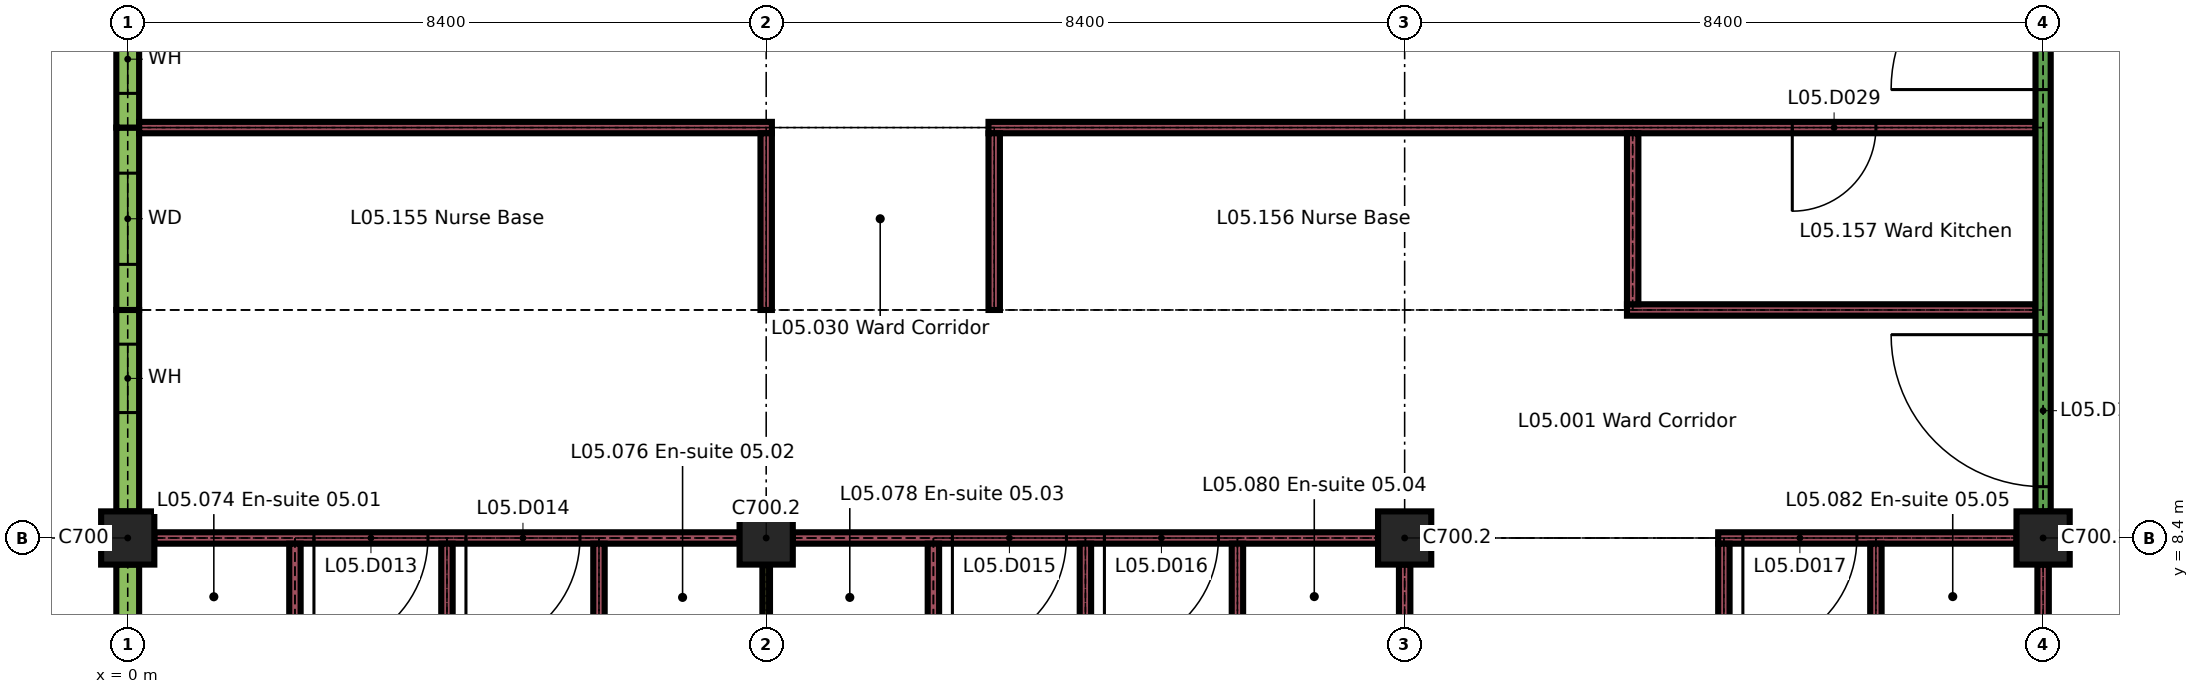
"""IFC4 building model, lengths in metres.
Left out: names, types, materials, properties, quantities, classifications, styles, units other than length and angle.
Written with IfcOpenShell. Run it as: python <this file> out.ifc"""

import sys

from ifc_helpers import new_model, si_unit, direction, frame, frame_2d, origin, origin_2d, place, context, subcontext, project, spatial, rectangle, extrude, element, fill, save


model = new_model("IFC4")
c1 = context("Model", 3, precision=1e-05, world=origin(), true_north=direction((0.0, 1.0)))
c2 = subcontext(c1, "Body", "Model", "MODEL_VIEW")
j1 = project(units=[si_unit("LENGTHUNIT", "METRE"), si_unit("PLANEANGLEUNIT", "RADIAN")], contexts=[c1])
p1 = place(None, origin())
s1 = spatial("IfcSite", under=j1, at=p1, CompositionType="ELEMENT")
p2 = place(p1, origin())
s2 = spatial("IfcBuilding", under=s1, at=p2, CompositionType="ELEMENT")
p3 = place(p2, frame((0.0, 0.0, 22.5)))
s3 = spatial("IfcBuildingStorey", under=s2, at=p3, CompositionType="ELEMENT", Elevation=22.5)
for number, where, z_axis, x_axis in (
    (1, (0.0, 8.4, 0.0), (0.0, 0.0, 1.0), (1.0, 0.0, 0.0)),
    (2, (8.4, 8.4, 0.0), (0.0, 0.0, 1.0), (1.0, 0.0, 0.0)),
    (3, (16.8, 8.4, 0.0), (0.0, 0.0, 1.0), (1.0, 0.0, 0.0)),
    (4, (25.2, 8.4, 0.0), (0.0, 0.0, 1.0), (1.0, 0.0, 0.0)),
):
    element("IfcColumn", number, at=place(p3, frame(where, z_axis=z_axis, x_axis=x_axis)), inside=s3, PredefinedType="COLUMN", context=c2, shape_type="SweptSolid", body=[
        extrude(rectangle(XDim=0.7, YDim=0.7, at=origin_2d()), origin(), (0.0, 0.0, 1.0), 3.26),
    ])
p4 = place(p3, frame((0.0, 6.0, 0.0), z_axis=(0.0, 0.0, 1.0), x_axis=(0.0, 1.0, 0.0)))
e5 = element("IfcWall", 5, at=p4, inside=s3, PredefinedType="SOLIDWALL", context=c2, shape_type="SweptSolid", body=[
    extrude(rectangle(XDim=2.05, YDim=0.3, at=frame_2d((1.025, 0.0))), origin(), (0.0, 0.0, 1.0), 2.96),
])
p5 = place(p3, frame((0.0, 8.75, 0.0), z_axis=(0.0, 0.0, 1.0), x_axis=(0.0, 1.0, 0.0)))
e6 = element("IfcWall", 6, at=p5, inside=s3, PredefinedType="SOLIDWALL", context=c2, shape_type="SweptSolid", body=[
    extrude(rectangle(XDim=2.65, YDim=0.3, at=frame_2d((1.325, 0.0))), origin(), (0.0, 0.0, 1.0), 2.96),
])
p6 = place(p5, frame((1.3, 0.0, 0.9)))
e7 = element("IfcOpeningElement", 7, at=p6, cuts=e6, PredefinedType="OPENING", context=c2, shape_type="SweptSolid", body=[
    extrude(rectangle(XDim=0.9, YDim=1.5, at=frame_2d((0.45, 0.75))), frame((0.0, 0.16, 0.0), z_axis=(0.0, -1.0, 0.0), x_axis=(1.0, 0.0, 0.0)), (0.0, 0.0, 1.0), 0.32),
])
p7 = place(p3, frame((0.0, 11.4, 0.0), z_axis=(0.0, 0.0, 1.0), x_axis=(0.0, 1.0, 0.0)))
e8 = element("IfcWall", 8, at=p7, inside=s3, PredefinedType="SOLIDWALL", context=c2, shape_type="SweptSolid", body=[
    extrude(rectangle(XDim=2.4, YDim=0.3, at=frame_2d((1.2, 0.0))), origin(), (0.0, 0.0, 1.0), 2.96),
])
p8 = place(p7, frame((0.6, 0.0, 0.9)))
e9 = element("IfcOpeningElement", 9, at=p8, cuts=e8, PredefinedType="OPENING", context=c2, shape_type="SweptSolid", body=[
    extrude(rectangle(XDim=1.2, YDim=1.5, at=frame_2d((0.6, 0.75))), frame((0.0, 0.16, 0.0), z_axis=(0.0, -1.0, 0.0), x_axis=(1.0, 0.0, 0.0)), (0.0, 0.0, 1.0), 0.32),
])
p9 = place(p3, frame((0.0, 13.8, 0.0), z_axis=(0.0, 0.0, 1.0), x_axis=(0.0, 1.0, 0.0)))
e10 = element("IfcWall", 10, at=p9, inside=s3, PredefinedType="SOLIDWALL", context=c2, shape_type="SweptSolid", body=[
    extrude(rectangle(XDim=3.0, YDim=0.3, at=frame_2d((1.5, 0.0))), origin(), (0.0, 0.0, 1.0), 2.96),
])
p10 = place(p9, frame((0.45, 0.0, 0.9)))
e11 = element("IfcOpeningElement", 11, at=p10, cuts=e10, PredefinedType="OPENING", context=c2, shape_type="SweptSolid", body=[
    extrude(rectangle(XDim=0.9, YDim=1.5, at=frame_2d((0.45, 0.75))), frame((0.0, 0.16, 0.0), z_axis=(0.0, -1.0, 0.0), x_axis=(1.0, 0.0, 0.0)), (0.0, 0.0, 1.0), 0.32),
])
p11 = place(p3, frame((0.35, 8.4, 0.0), z_axis=(0.0, 0.0, 1.0), x_axis=(1.0, 0.0, 0.0)))
e12 = element("IfcWall", 12, at=p11, inside=s3, PredefinedType="PARTITIONING", context=c2, shape_type="SweptSolid", body=[
    extrude(rectangle(XDim=7.7, YDim=0.15, at=frame_2d((3.85, 0.0))), origin(), (0.0, 0.0, 1.0), 3.26),
])
p12 = place(p11, frame((2.1, 0.0, 0.0)))
e13 = element("IfcOpeningElement", 13, at=p12, cuts=e12, PredefinedType="OPENING", context=c2, shape_type="SweptSolid", body=[
    extrude(rectangle(XDim=1.5, YDim=2.4, at=frame_2d((0.75, 1.2))), frame((0.0, 0.085, 0.0), z_axis=(0.0, -1.0, 0.0), x_axis=(1.0, 0.0, 0.0)), (0.0, 0.0, 1.0), 0.17),
])
p13 = place(p11, frame((4.1, 0.0, 0.0)))
e14 = element("IfcOpeningElement", 14, at=p13, cuts=e12, PredefinedType="OPENING", context=c2, shape_type="SweptSolid", body=[
    extrude(rectangle(XDim=1.5, YDim=2.4, at=frame_2d((0.75, 1.2))), frame((0.0, 0.085, 0.0), z_axis=(0.0, -1.0, 0.0), x_axis=(1.0, 0.0, 0.0)), (0.0, 0.0, 1.0), 0.17),
])
p14 = place(p3, frame((8.75, 8.4, 0.0), z_axis=(0.0, 0.0, 1.0), x_axis=(1.0, 0.0, 0.0)))
e15 = element("IfcWall", 15, at=p14, inside=s3, PredefinedType="PARTITIONING", context=c2, shape_type="SweptSolid", body=[
    extrude(rectangle(XDim=7.7, YDim=0.15, at=frame_2d((3.85, 0.0))), origin(), (0.0, 0.0, 1.0), 3.26),
])
p15 = place(p14, frame((2.1, 0.0, 0.0)))
e16 = element("IfcOpeningElement", 16, at=p15, cuts=e15, PredefinedType="OPENING", context=c2, shape_type="SweptSolid", body=[
    extrude(rectangle(XDim=1.5, YDim=2.4, at=frame_2d((0.75, 1.2))), frame((0.0, 0.085, 0.0), z_axis=(0.0, -1.0, 0.0), x_axis=(1.0, 0.0, 0.0)), (0.0, 0.0, 1.0), 0.17),
])
p16 = place(p14, frame((4.1, 0.0, 0.0)))
e17 = element("IfcOpeningElement", 17, at=p16, cuts=e15, PredefinedType="OPENING", context=c2, shape_type="SweptSolid", body=[
    extrude(rectangle(XDim=1.5, YDim=2.4, at=frame_2d((0.75, 1.2))), frame((0.0, 0.085, 0.0), z_axis=(0.0, -1.0, 0.0), x_axis=(1.0, 0.0, 0.0)), (0.0, 0.0, 1.0), 0.17),
])
p17 = place(p3, frame((20.925, 8.4, 0.0), z_axis=(0.0, 0.0, 1.0), x_axis=(1.0, 0.0, 0.0)))
e18 = element("IfcWall", 18, at=p17, inside=s3, PredefinedType="PARTITIONING", context=c2, shape_type="SweptSolid", body=[
    extrude(rectangle(XDim=3.925, YDim=0.15, at=frame_2d((1.962, 0.0))), origin(), (0.0, 0.0, 1.0), 3.26),
])
p18 = place(p17, frame((0.325, 0.0, 0.0)))
e19 = element("IfcOpeningElement", 19, at=p18, cuts=e18, PredefinedType="OPENING", context=c2, shape_type="SweptSolid", body=[
    extrude(rectangle(XDim=1.5, YDim=2.4, at=frame_2d((0.75, 1.2))), frame((0.0, 0.085, 0.0), z_axis=(0.0, -1.0, 0.0), x_axis=(1.0, 0.0, 0.0)), (0.0, 0.0, 1.0), 0.17),
])
p19 = place(p3, frame((19.725, 11.4, 0.0), z_axis=(0.0, 0.0, 1.0), x_axis=(1.0, 0.0, 0.0)))
e20 = element("IfcWall", 20, at=p19, inside=s3, PredefinedType="PARTITIONING", context=c2, shape_type="SweptSolid", body=[
    extrude(rectangle(XDim=5.375, YDim=0.15, at=frame_2d((2.688, 0.0))), origin(), (0.0, 0.0, 1.0), 3.26),
])
p20 = place(p3, frame((0.15, 13.8, 0.0), z_axis=(0.0, 0.0, 1.0), x_axis=(1.0, 0.0, 0.0)))
e21 = element("IfcWall", 21, at=p20, inside=s3, PredefinedType="PARTITIONING", context=c2, shape_type="SweptSolid", body=[
    extrude(rectangle(XDim=8.325, YDim=0.15, at=frame_2d((4.163, 0.0))), origin(), (0.0, 0.0, 1.0), 3.26),
])
p21 = place(p3, frame((11.325, 13.8, 0.0), z_axis=(0.0, 0.0, 1.0), x_axis=(1.0, 0.0, 0.0)))
e22 = element("IfcWall", 22, at=p21, inside=s3, PredefinedType="PARTITIONING", context=c2, shape_type="SweptSolid", body=[
    extrude(rectangle(XDim=13.775, YDim=0.15, at=frame_2d((6.888, 0.0))), origin(), (0.0, 0.0, 1.0), 3.26),
])
p22 = place(p21, frame((10.575, 0.0, 0.0)))
e23 = element("IfcOpeningElement", 23, at=p22, cuts=e22, PredefinedType="OPENING", context=c2, shape_type="SweptSolid", body=[
    extrude(rectangle(XDim=1.1, YDim=2.1, at=frame_2d((0.55, 1.05))), frame((0.0, 0.085, 0.0), z_axis=(0.0, -1.0, 0.0), x_axis=(1.0, 0.0, 0.0)), (0.0, 0.0, 1.0), 0.17),
])
p23 = place(p3, frame((2.2, 6.075, 0.0), z_axis=(0.0, 0.0, 1.0), x_axis=(0.0, 1.0, 0.0)))
e24 = element("IfcWall", 24, at=p23, inside=s3, PredefinedType="PARTITIONING", context=c2, shape_type="SweptSolid", body=[
    extrude(rectangle(XDim=2.25, YDim=0.15, at=frame_2d((1.125, 0.0))), origin(), (0.0, 0.0, 1.0), 3.26),
])
p24 = place(p3, frame((4.2, 0.15, 0.0), z_axis=(0.0, 0.0, 1.0), x_axis=(0.0, 1.0, 0.0)))
e25 = element("IfcWall", 25, at=p24, inside=s3, PredefinedType="PARTITIONING", context=c2, shape_type="SweptSolid", body=[
    extrude(rectangle(XDim=8.175, YDim=0.15, at=frame_2d((4.087, 0.0))), origin(), (0.0, 0.0, 1.0), 3.26),
])
p25 = place(p3, frame((6.2, 6.075, 0.0), z_axis=(0.0, 0.0, 1.0), x_axis=(0.0, 1.0, 0.0)))
e26 = element("IfcWall", 26, at=p25, inside=s3, PredefinedType="PARTITIONING", context=c2, shape_type="SweptSolid", body=[
    extrude(rectangle(XDim=2.25, YDim=0.15, at=frame_2d((1.125, 0.0))), origin(), (0.0, 0.0, 1.0), 3.26),
])
p26 = place(p3, frame((8.4, 6.075, 0.0), z_axis=(0.0, 0.0, 1.0), x_axis=(0.0, 1.0, 0.0)))
e27 = element("IfcWall", 27, at=p26, inside=s3, PredefinedType="PARTITIONING", context=c2, shape_type="SweptSolid", body=[
    extrude(rectangle(XDim=1.975, YDim=0.1, at=frame_2d((0.988, 0.0))), origin(), (0.0, 0.0, 1.0), 3.26),
])
p27 = place(p3, frame((8.4, 11.4, 0.0), z_axis=(0.0, 0.0, 1.0), x_axis=(0.0, 1.0, 0.0)))
e28 = element("IfcWall", 28, at=p27, inside=s3, PredefinedType="PARTITIONING", context=c2, shape_type="SweptSolid", body=[
    extrude(rectangle(XDim=2.325, YDim=0.15, at=frame_2d((1.163, 0.0))), origin(), (0.0, 0.0, 1.0), 3.26),
])
p28 = place(p3, frame((10.6, 6.075, 0.0), z_axis=(0.0, 0.0, 1.0), x_axis=(0.0, 1.0, 0.0)))
e29 = element("IfcWall", 29, at=p28, inside=s3, PredefinedType="PARTITIONING", context=c2, shape_type="SweptSolid", body=[
    extrude(rectangle(XDim=2.25, YDim=0.15, at=frame_2d((1.125, 0.0))), origin(), (0.0, 0.0, 1.0), 3.26),
])
p29 = place(p3, frame((11.4, 11.4, 0.0), z_axis=(0.0, 0.0, 1.0), x_axis=(0.0, 1.0, 0.0)))
e30 = element("IfcWall", 30, at=p29, inside=s3, PredefinedType="PARTITIONING", context=c2, shape_type="SweptSolid", body=[
    extrude(rectangle(XDim=2.325, YDim=0.15, at=frame_2d((1.163, 0.0))), origin(), (0.0, 0.0, 1.0), 3.26),
])
p30 = place(p3, frame((12.6, 0.15, 0.0), z_axis=(0.0, 0.0, 1.0), x_axis=(0.0, 1.0, 0.0)))
e31 = element("IfcWall", 31, at=p30, inside=s3, PredefinedType="PARTITIONING", context=c2, shape_type="SweptSolid", body=[
    extrude(rectangle(XDim=8.175, YDim=0.15, at=frame_2d((4.087, 0.0))), origin(), (0.0, 0.0, 1.0), 3.26),
])
p31 = place(p3, frame((14.6, 6.075, 0.0), z_axis=(0.0, 0.0, 1.0), x_axis=(0.0, 1.0, 0.0)))
e32 = element("IfcWall", 32, at=p31, inside=s3, PredefinedType="PARTITIONING", context=c2, shape_type="SweptSolid", body=[
    extrude(rectangle(XDim=2.25, YDim=0.15, at=frame_2d((1.125, 0.0))), origin(), (0.0, 0.0, 1.0), 3.26),
])
p32 = place(p3, frame((16.8, 0.35, 0.0), z_axis=(0.0, 0.0, 1.0), x_axis=(0.0, 1.0, 0.0)))
e33 = element("IfcWall", 33, at=p32, inside=s3, PredefinedType="PARTITIONING", context=c2, shape_type="SweptSolid", body=[
    extrude(rectangle(XDim=7.7, YDim=0.15, at=frame_2d((3.85, 0.0))), origin(), (0.0, 0.0, 1.0), 3.26),
])
p33 = place(p3, frame((19.8, 11.475, 0.0), z_axis=(0.0, 0.0, 1.0), x_axis=(0.0, 1.0, 0.0)))
e34 = element("IfcWall", 34, at=p33, inside=s3, PredefinedType="PARTITIONING", context=c2, shape_type="SweptSolid", body=[
    extrude(rectangle(XDim=2.25, YDim=0.15, at=frame_2d((1.125, 0.0))), origin(), (0.0, 0.0, 1.0), 3.26),
])
p34 = place(p3, frame((21.0, 0.15, 0.0), z_axis=(0.0, 0.0, 1.0), x_axis=(0.0, 1.0, 0.0)))
e35 = element("IfcWall", 35, at=p34, inside=s3, PredefinedType="PARTITIONING", context=c2, shape_type="SweptSolid", body=[
    extrude(rectangle(XDim=8.175, YDim=0.15, at=frame_2d((4.087, 0.0))), origin(), (0.0, 0.0, 1.0), 3.26),
])
p35 = place(p3, frame((23.0, 6.075, 0.0), z_axis=(0.0, 0.0, 1.0), x_axis=(0.0, 1.0, 0.0)))
e36 = element("IfcWall", 36, at=p35, inside=s3, PredefinedType="PARTITIONING", context=c2, shape_type="SweptSolid", body=[
    extrude(rectangle(XDim=2.25, YDim=0.15, at=frame_2d((1.125, 0.0))), origin(), (0.0, 0.0, 1.0), 3.26),
])
p36 = place(p3, frame((25.2, 0.35, 0.0), z_axis=(0.0, 0.0, 1.0), x_axis=(0.0, 1.0, 0.0)))
e37 = element("IfcWall", 37, at=p36, inside=s3, PredefinedType="PARTITIONING", context=c2, shape_type="SweptSolid", body=[
    extrude(rectangle(XDim=7.7, YDim=0.15, at=frame_2d((3.85, 0.0))), origin(), (0.0, 0.0, 1.0), 3.26),
])
p37 = place(p3, frame((25.2, 8.75, 0.0), z_axis=(0.0, 0.0, 1.0), x_axis=(0.0, 1.0, 0.0)))
e38 = element("IfcWall", 38, at=p37, inside=s3, PredefinedType="PARTITIONING", context=c2, shape_type="SweptSolid", body=[
    extrude(rectangle(XDim=12.85, YDim=0.2, at=frame_2d((6.425, 0.0))), origin(), (0.0, 0.0, 1.0), 3.26),
])
p38 = place(p37, frame((0.325, 0.0, 0.0)))
e39 = element("IfcOpeningElement", 39, at=p38, cuts=e38, PredefinedType="OPENING", context=c2, shape_type="SweptSolid", body=[
    extrude(rectangle(XDim=2.0, YDim=2.4, at=frame_2d((1.0, 1.2))), frame((0.0, 0.11, 0.0), z_axis=(0.0, -1.0, 0.0), x_axis=(1.0, 0.0, 0.0)), (0.0, 0.0, 1.0), 0.22),
])
p39 = place(p37, frame((5.55, 0.0, 0.0)))
e40 = element("IfcOpeningElement", 40, at=p39, cuts=e38, PredefinedType="OPENING", context=c2, shape_type="SweptSolid", body=[
    extrude(rectangle(XDim=2.0, YDim=2.4, at=frame_2d((1.0, 1.2))), frame((0.0, 0.11, 0.0), z_axis=(0.0, -1.0, 0.0), x_axis=(1.0, 0.0, 0.0)), (0.0, 0.0, 1.0), 0.22),
])
p40 = place(p6, origin())
e41 = element("IfcWindow", 41, at=p40, inside=s3, PartitioningType="SINGLE_PANEL", PredefinedType="WINDOW", context=c2, shape_type="SweptSolid", body=[
    extrude(rectangle(XDim=0.9, YDim=1.5, at=frame_2d((0.45, 0.75))), frame((0.0, 0.03, 0.0), z_axis=(0.0, -1.0, 0.0), x_axis=(1.0, 0.0, 0.0)), (0.0, 0.0, 1.0), 0.06),
])
fill(e7, e41)
p41 = place(p8, origin())
e42 = element("IfcWindow", 42, at=p41, inside=s3, PartitioningType="SINGLE_PANEL", PredefinedType="WINDOW", context=c2, shape_type="SweptSolid", body=[
    extrude(rectangle(XDim=1.2, YDim=1.5, at=frame_2d((0.6, 0.75))), frame((0.0, 0.03, 0.0), z_axis=(0.0, -1.0, 0.0), x_axis=(1.0, 0.0, 0.0)), (0.0, 0.0, 1.0), 0.06),
])
fill(e9, e42)
p42 = place(p10, origin())
e43 = element("IfcWindow", 43, at=p42, inside=s3, PartitioningType="SINGLE_PANEL", PredefinedType="WINDOW", context=c2, shape_type="SweptSolid", body=[
    extrude(rectangle(XDim=0.9, YDim=1.5, at=frame_2d((0.45, 0.75))), frame((0.0, 0.03, 0.0), z_axis=(0.0, -1.0, 0.0), x_axis=(1.0, 0.0, 0.0)), (0.0, 0.0, 1.0), 0.06),
])
fill(e11, e43)
p43 = place(p12, origin())
e44 = element("IfcDoor", 44, at=p43, inside=s3, OperationType="SINGLE_SWING_LEFT", PredefinedType="DOOR", context=c2, shape_type="SweptSolid", body=[
    extrude(rectangle(XDim=1.5, YDim=2.4, at=frame_2d((0.75, 1.2))), frame((0.0, 0.03, 0.0), z_axis=(0.0, -1.0, 0.0), x_axis=(1.0, 0.0, 0.0)), (0.0, 0.0, 1.0), 0.06),
])
fill(e13, e44)
p44 = place(p13, origin())
e45 = element("IfcDoor", 45, at=p44, inside=s3, OperationType="SINGLE_SWING_LEFT", PredefinedType="DOOR", context=c2, shape_type="SweptSolid", body=[
    extrude(rectangle(XDim=1.5, YDim=2.4, at=frame_2d((0.75, 1.2))), frame((0.0, 0.03, 0.0), z_axis=(0.0, -1.0, 0.0), x_axis=(1.0, 0.0, 0.0)), (0.0, 0.0, 1.0), 0.06),
])
fill(e14, e45)
p45 = place(p15, origin())
e46 = element("IfcDoor", 46, at=p45, inside=s3, OperationType="SINGLE_SWING_LEFT", PredefinedType="DOOR", context=c2, shape_type="SweptSolid", body=[
    extrude(rectangle(XDim=1.5, YDim=2.4, at=frame_2d((0.75, 1.2))), frame((0.0, 0.03, 0.0), z_axis=(0.0, -1.0, 0.0), x_axis=(1.0, 0.0, 0.0)), (0.0, 0.0, 1.0), 0.06),
])
fill(e16, e46)
p46 = place(p16, origin())
e47 = element("IfcDoor", 47, at=p46, inside=s3, OperationType="SINGLE_SWING_LEFT", PredefinedType="DOOR", context=c2, shape_type="SweptSolid", body=[
    extrude(rectangle(XDim=1.5, YDim=2.4, at=frame_2d((0.75, 1.2))), frame((0.0, 0.03, 0.0), z_axis=(0.0, -1.0, 0.0), x_axis=(1.0, 0.0, 0.0)), (0.0, 0.0, 1.0), 0.06),
])
fill(e17, e47)
p47 = place(p18, origin())
e48 = element("IfcDoor", 48, at=p47, inside=s3, OperationType="SINGLE_SWING_LEFT", PredefinedType="DOOR", context=c2, shape_type="SweptSolid", body=[
    extrude(rectangle(XDim=1.5, YDim=2.4, at=frame_2d((0.75, 1.2))), frame((0.0, 0.03, 0.0), z_axis=(0.0, -1.0, 0.0), x_axis=(1.0, 0.0, 0.0)), (0.0, 0.0, 1.0), 0.06),
])
fill(e19, e48)
p48 = place(p22, origin())
e49 = element("IfcDoor", 49, at=p48, inside=s3, OperationType="SINGLE_SWING_LEFT", PredefinedType="DOOR", context=c2, shape_type="SweptSolid", body=[
    extrude(rectangle(XDim=1.1, YDim=2.1, at=frame_2d((0.55, 1.05))), frame((0.0, 0.025, 0.0), z_axis=(0.0, -1.0, 0.0), x_axis=(1.0, 0.0, 0.0)), (0.0, 0.0, 1.0), 0.05),
])
fill(e23, e49)
p49 = place(p38, origin())
e50 = element("IfcDoor", 50, at=p49, inside=s3, OperationType="SINGLE_SWING_LEFT", PredefinedType="DOOR", context=c2, shape_type="SweptSolid", body=[
    extrude(rectangle(XDim=2.0, YDim=2.4, at=frame_2d((1.0, 1.2))), frame((0.0, 0.03, 0.0), z_axis=(0.0, -1.0, 0.0), x_axis=(1.0, 0.0, 0.0)), (0.0, 0.0, 1.0), 0.06),
])
fill(e39, e50)
p50 = place(p39, origin())
e51 = element("IfcDoor", 51, at=p50, inside=s3, OperationType="SINGLE_SWING_RIGHT", PredefinedType="DOOR", context=c2, shape_type="SweptSolid", body=[
    extrude(rectangle(XDim=2.0, YDim=2.4, at=frame_2d((1.0, 1.2))), frame((0.0, 0.03, 0.0), z_axis=(0.0, -1.0, 0.0), x_axis=(1.0, 0.0, 0.0)), (0.0, 0.0, 1.0), 0.06),
])
fill(e40, e51)
save(model, sys.argv[1])
